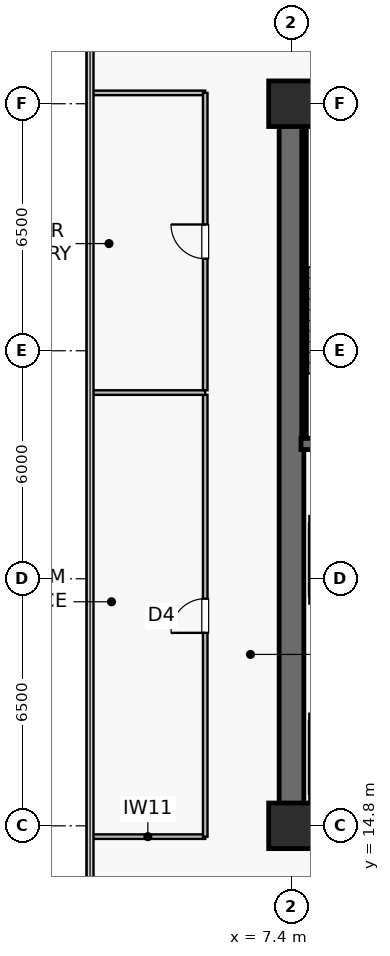
"""IFC4 building model, lengths in metres.
Left out: names, types, materials, properties, quantities, classifications, styles, units other than length and angle.
Written with IfcOpenShell. Run it as: python <this file> out.ifc"""

import sys

from ifc_helpers import new_model, si_unit, direction, frame, frame_2d, origin, origin_2d, place, context, subcontext, project, spatial, rectangle, extrude, source, transform, mapped, element, fill, save


model = new_model("IFC4")
c1 = context("Model", 3, precision=1e-05, world=origin(), true_north=direction((0.0, 1.0)))
c2 = subcontext(c1, "Body", "Model", "MODEL_VIEW")
j1 = project(units=[si_unit("LENGTHUNIT", "METRE"), si_unit("PLANEANGLEUNIT", "RADIAN")], contexts=[c1])
p1 = place(None, origin())
s1 = spatial("IfcSite", under=j1, at=p1, CompositionType="ELEMENT")
p2 = place(p1, origin())
s2 = spatial("IfcBuilding", under=s1, at=p2, CompositionType="ELEMENT")
p3 = place(p2, frame((0.0, 0.0, 105.1)))
s3 = spatial("IfcBuildingStorey", under=s2, at=p3, CompositionType="ELEMENT", Elevation=105.1)
p4 = place(p3, frame((7.075, 14.8, 0.0), z_axis=(0.0, 0.0, 1.0), x_axis=(1.0, 0.0, 0.0)))
e1 = element("IfcWall", 1, at=p4, inside=s3, PredefinedType="SHEAR", context=c2, shape_type="SweptSolid", body=[
    extrude(rectangle(XDim=15.45, YDim=0.65, at=frame_2d((7.725, 0.0))), origin(), (0.0, 0.0, 1.0), 3.79),
])
p5 = place(p3, frame((7.075, 33.8, 0.0), z_axis=(0.0, 0.0, 1.0), x_axis=(1.0, 0.0, 0.0)))
e2 = element("IfcWall", 2, at=p5, inside=s3, PredefinedType="SHEAR", context=c2, shape_type="SweptSolid", body=[
    extrude(rectangle(XDim=15.45, YDim=0.65, at=frame_2d((7.725, 0.0))), origin(), (0.0, 0.0, 1.0), 3.79),
])
p6 = place(p5, frame((5.25, 0.0, 0.0)))
e3 = element("IfcOpeningElement", 3, at=p6, cuts=e2, PredefinedType="OPENING", context=c2, shape_type="SweptSolid", body=[
    extrude(rectangle(XDim=0.95, YDim=2.15, at=frame_2d((0.475, 1.075))), frame((0.0, 0.335, 0.0), z_axis=(0.0, -1.0, 0.0), x_axis=(1.0, 0.0, 0.0)), (0.0, 0.0, 1.0), 0.67),
])
p7 = place(p5, frame((7.765, 0.0, 0.0)))
e4 = element("IfcOpeningElement", 4, at=p7, cuts=e2, PredefinedType="OPENING", context=c2, shape_type="SweptSolid", body=[
    extrude(rectangle(XDim=0.95, YDim=2.15, at=frame_2d((0.475, 1.075))), frame((0.0, 0.335, 0.0), z_axis=(0.0, -1.0, 0.0), x_axis=(1.0, 0.0, 0.0)), (0.0, 0.0, 1.0), 0.67),
])
p8 = place(p5, frame((10.315, 0.0, 0.0)))
e5 = element("IfcOpeningElement", 5, at=p8, cuts=e2, PredefinedType="OPENING", context=c2, shape_type="SweptSolid", body=[
    extrude(rectangle(XDim=0.95, YDim=2.15, at=frame_2d((0.475, 1.075))), frame((0.0, 0.335, 0.0), z_axis=(0.0, -1.0, 0.0), x_axis=(1.0, 0.0, 0.0)), (0.0, 0.0, 1.0), 0.67),
])
p9 = place(p5, frame((12.865, 0.0, 0.0)))
e6 = element("IfcOpeningElement", 6, at=p9, cuts=e2, PredefinedType="OPENING", context=c2, shape_type="SweptSolid", body=[
    extrude(rectangle(XDim=0.95, YDim=2.15, at=frame_2d((0.475, 1.075))), frame((0.0, 0.335, 0.0), z_axis=(0.0, -1.0, 0.0), x_axis=(1.0, 0.0, 0.0)), (0.0, 0.0, 1.0), 0.67),
])
p10 = place(p3, frame((7.4, 15.125, 0.0), z_axis=(0.0, 0.0, 1.0), x_axis=(0.0, 1.0, 0.0)))
e7 = element("IfcWall", 7, at=p10, inside=s3, PredefinedType="SHEAR", context=c2, shape_type="SweptSolid", body=[
    extrude(rectangle(XDim=18.35, YDim=0.65, at=frame_2d((9.175, 0.0))), origin(), (0.0, 0.0, 1.0), 3.79),
])
p11 = place(p3, frame((7.65, 24.85, 0.0), z_axis=(0.0, 0.0, 1.0), x_axis=(1.0, 0.0, 0.0)))
e8 = element("IfcWall", 8, at=p11, inside=s3, PredefinedType="SHEAR", context=c2, shape_type="SweptSolid", body=[
    extrude(rectangle(XDim=3.8, YDim=0.3, at=frame_2d((1.9, 0.0))), origin(), (0.0, 0.0, 1.0), 3.79),
])
p12 = place(p3, frame((7.73, 33.4, 0.0), z_axis=(0.0, 0.0, 1.0), x_axis=(1.0, 0.0, 0.0)))
e9 = element("IfcWall", 9, at=p12, inside=s3, PredefinedType="SOLIDWALL", context=c2, shape_type="SweptSolid", body=[
    extrude(rectangle(XDim=3.72, YDim=0.12, at=frame_2d((1.86, 0.0))), origin(), (0.0, 0.0, 1.0), 3.79),
])
p13 = place(p3, frame((7.73, 25.0, 0.0), z_axis=(0.0, 0.0, 1.0), x_axis=(0.0, 1.0, 0.0)))
e10 = element("IfcWall", 10, at=p13, inside=s3, PredefinedType="SOLIDWALL", context=c2, shape_type="SweptSolid", body=[
    extrude(rectangle(XDim=8.32, YDim=0.12, at=frame_2d((4.16, 0.0))), origin(), (0.0, 0.0, 1.0), 3.79),
])
m1 = source(origin(), c2, "Body", "SweptSolid", [
    extrude(rectangle(XDim=1.2, YDim=1.2, at=origin_2d()), origin(), (0.0, 0.0, 1.0), 4.1),
])
for number, where, z_axis, x_axis in (
    (11, (7.4, 14.8, 0.0), (0.0, 0.0, 1.0), (1.0, 0.0, 0.0)),
    (12, (7.4, 33.8, 0.0), (0.0, 0.0, 1.0), (1.0, 0.0, 0.0)),
):
    element("IfcColumn", number, at=place(p3, frame(where, z_axis=z_axis, x_axis=x_axis)), inside=s3, PredefinedType="COLUMN", context=c2, shape_type="MappedRepresentation", body=[
        mapped(m1, transform((0.0, 0.0, 0.0), scale=1.0)),
    ])
for number, where, z_axis, x_axis in (
    (13, (7.87, 17.65, 0.0), (0.0, 0.0, 1.0), (1.0, 0.0, 0.0)),
    (14, (7.87, 15.55, 0.0), (0.0, 0.0, 1.0), (1.0, 0.0, 0.0)),
):
    element("IfcWall", number, at=place(p3, frame(where, z_axis=z_axis, x_axis=x_axis)), inside=s3, PredefinedType="SOLIDWALL", context=c2, shape_type="SweptSolid", body=[
        extrude(rectangle(XDim=2.26, YDim=0.2, at=frame_2d((1.13, 0.0))), origin(), (0.0, 0.0, 1.0), 3.79),
    ])
p14 = place(p3, frame((7.95, 15.65, 0.0), z_axis=(0.0, 0.0, 1.0), x_axis=(0.0, 1.0, 0.0)))
e15 = element("IfcWall", 15, at=p14, inside=s3, PredefinedType="SOLIDWALL", context=c2, shape_type="SweptSolid", body=[
    extrude(rectangle(XDim=1.9, YDim=0.18, at=frame_2d((0.95, 0.0))), origin(), (0.0, 0.0, 1.0), 3.79),
])
for number, where, z_axis, x_axis in (
    (16, (7.87, 20.75, 0.0), (0.0, 0.0, 1.0), (1.0, 0.0, 0.0)),
    (17, (7.87, 22.85, 0.0), (0.0, 0.0, 1.0), (1.0, 0.0, 0.0)),
):
    element("IfcWall", number, at=place(p3, frame(where, z_axis=z_axis, x_axis=x_axis)), inside=s3, PredefinedType="SOLIDWALL", context=c2, shape_type="SweptSolid", body=[
        extrude(rectangle(XDim=2.26, YDim=0.2, at=frame_2d((1.13, 0.0))), origin(), (0.0, 0.0, 1.0), 3.79),
    ])
p15 = place(p3, frame((7.95, 20.85, 0.0), z_axis=(0.0, 0.0, 1.0), x_axis=(0.0, 1.0, 0.0)))
e18 = element("IfcWall", 18, at=p15, inside=s3, PredefinedType="SOLIDWALL", context=c2, shape_type="SweptSolid", body=[
    extrude(rectangle(XDim=1.9, YDim=0.18, at=frame_2d((0.95, 0.0))), origin(), (0.0, 0.0, 1.0), 3.79),
])
for number, where, z_axis, x_axis in (
    (19, (2.11, 14.515, 0.0), (0.0, 0.0, 1.0), (1.0, 0.0, 0.0)),
    (20, (2.11, 34.085, 0.0), (0.0, 0.0, 1.0), (1.0, 0.0, 0.0)),
):
    element("IfcWall", number, at=place(p3, frame(where, z_axis=z_axis, x_axis=x_axis)), inside=s3, PredefinedType="PARTITIONING", context=c2, shape_type="SweptSolid", body=[
        extrude(rectangle(XDim=3.02, YDim=0.12, at=frame_2d((1.51, 0.0))), origin(), (0.0, 0.0, 1.0), 3.79),
    ])
p16 = place(p3, frame((5.13, 14.515, 0.0), z_axis=(0.0, 0.0, 1.0), x_axis=(0.0, 1.0, 0.0)))
e21 = element("IfcWall", 21, at=p16, inside=s3, PredefinedType="PARTITIONING", context=c2, shape_type="SweptSolid", body=[
    extrude(rectangle(XDim=11.625, YDim=0.12, at=frame_2d((5.812, 0.0))), origin(), (0.0, 0.0, 1.0), 3.79),
])
p17 = place(p16, frame((5.363, 0.0, 0.0)))
e22 = element("IfcOpeningElement", 22, at=p17, cuts=e21, PredefinedType="OPENING", context=c2, shape_type="SweptSolid", body=[
    extrude(rectangle(XDim=0.9, YDim=2.1, at=frame_2d((0.45, 1.05))), frame((0.0, 0.07, 0.0), z_axis=(0.0, -1.0, 0.0), x_axis=(1.0, 0.0, 0.0)), (0.0, 0.0, 1.0), 0.14),
])
p18 = place(p3, frame((2.11, 26.2, 0.0), z_axis=(0.0, 0.0, 1.0), x_axis=(1.0, 0.0, 0.0)))
e23 = element("IfcWall", 23, at=p18, inside=s3, PredefinedType="PARTITIONING", context=c2, shape_type="SweptSolid", body=[
    extrude(rectangle(XDim=3.02, YDim=0.12, at=frame_2d((1.51, 0.0))), origin(), (0.0, 0.0, 1.0), 3.79),
])
p19 = place(p3, frame((5.13, 26.26, 0.0), z_axis=(0.0, 0.0, 1.0), x_axis=(0.0, 1.0, 0.0)))
e24 = element("IfcWall", 24, at=p19, inside=s3, PredefinedType="PARTITIONING", context=c2, shape_type="SweptSolid", body=[
    extrude(rectangle(XDim=7.825, YDim=0.12, at=frame_2d((3.913, 0.0))), origin(), (0.0, 0.0, 1.0), 3.79),
])
p20 = place(p19, frame((3.462, 0.0, 0.0)))
e25 = element("IfcOpeningElement", 25, at=p20, cuts=e24, PredefinedType="OPENING", context=c2, shape_type="SweptSolid", body=[
    extrude(rectangle(XDim=0.9, YDim=2.1, at=frame_2d((0.45, 1.05))), frame((0.0, 0.07, 0.0), z_axis=(0.0, -1.0, 0.0), x_axis=(1.0, 0.0, 0.0)), (0.0, 0.0, 1.0), 0.14),
])
m2 = source(origin(), c2, "Body", "SweptSolid", [
    extrude(rectangle(XDim=0.9, YDim=2.1, at=frame_2d((0.45, 1.05))), frame((0.0, 0.025, 0.0), z_axis=(0.0, -1.0, 0.0), x_axis=(1.0, 0.0, 0.0)), (0.0, 0.0, 1.0), 0.05),
])
p21 = place(p17, origin())
e26 = element("IfcDoor", 26, at=p21, inside=s3, OperationType="SINGLE_SWING_LEFT", PredefinedType="DOOR", context=c2, shape_type="MappedRepresentation", body=[
    mapped(m2, transform((0.0, 0.0, 0.0), scale=1.0)),
])
fill(e22, e26)
p22 = place(p20, origin())
e27 = element("IfcDoor", 27, at=p22, inside=s3, OperationType="SINGLE_SWING_RIGHT", PredefinedType="DOOR", context=c2, shape_type="MappedRepresentation", body=[
    mapped(m2, transform((0.0, 0.0, 0.0), scale=1.0)),
])
fill(e25, e27)
save(model, sys.argv[1])
